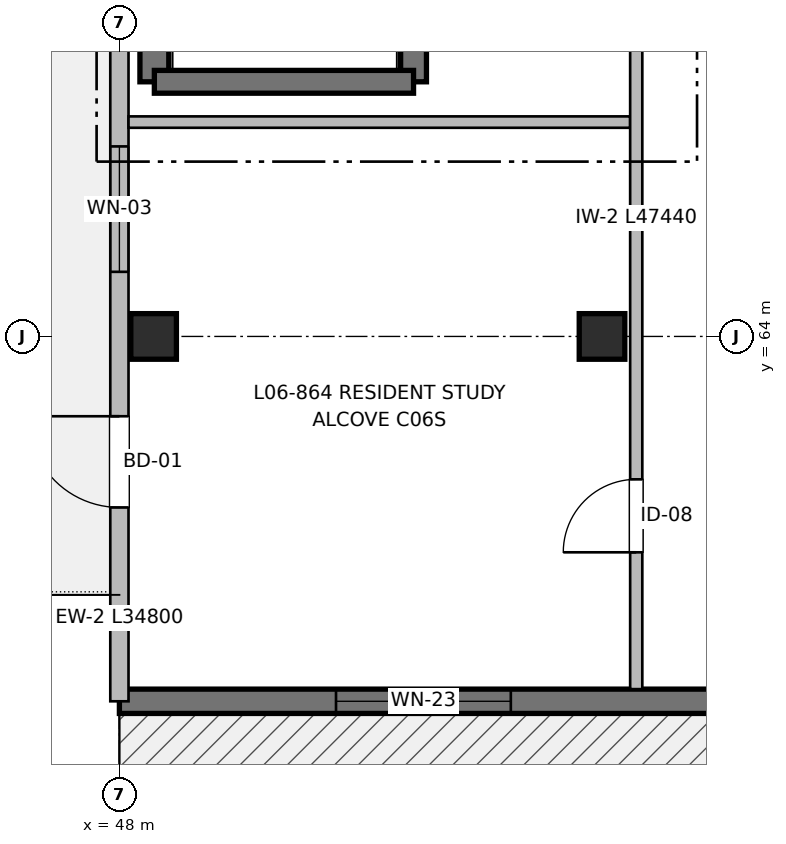
"""IFC4 building model, lengths in metres.
Left out: names, types, materials, properties, quantities, classifications, styles, units other than length and angle.
Written with IfcOpenShell. Run it as: python <this file> out.ifc"""

import sys

from ifc_helpers import new_model, si_unit, direction, frame, frame_2d, origin, origin_2d, place, context, subcontext, project, spatial, rectangle, extrude, element, fill, save


model = new_model("IFC4")
c1 = context("Model", 3, precision=1e-05, world=origin(), true_north=direction((0.0, 1.0)))
c2 = subcontext(c1, "Body", "Model", "MODEL_VIEW")
j1 = project(units=[si_unit("LENGTHUNIT", "METRE"), si_unit("PLANEANGLEUNIT", "RADIAN")], contexts=[c1])
p1 = place(None, origin())
s1 = spatial("IfcSite", under=j1, at=p1, CompositionType="ELEMENT")
p2 = place(p1, origin())
s2 = spatial("IfcBuilding", under=s1, at=p2, CompositionType="ELEMENT")
p3 = place(p2, frame((0.0, 0.0, 20.16)))
s3 = spatial("IfcBuildingStorey", under=s2, at=p3, CompositionType="ELEMENT", Elevation=20.16)
for number, where, z_axis, x_axis in (
    (1, (48.45, 64.0, 0.0), (0.0, 0.0, 1.0), (1.0, 0.0, 0.0)),
    (2, (54.35, 64.0, 0.0), (0.0, 0.0, 1.0), (1.0, 0.0, 0.0)),
):
    element("IfcColumn", number, at=place(p3, frame(where, z_axis=z_axis, x_axis=x_axis)), inside=s3, PredefinedType="COLUMN", context=c2, shape_type="SweptSolid", body=[
        extrude(rectangle(XDim=0.6, YDim=0.6, at=origin_2d()), origin(), (0.0, 0.0, 1.0), 3.2),
    ])
p4 = place(p3, frame((48.46, 67.35, 0.0), z_axis=(0.0, 0.0, 1.0), x_axis=(0.0, 1.0, 0.0)))
e3 = element("IfcWall", 3, at=p4, inside=s3, PredefinedType="SHEAR", context=c2, shape_type="SweptSolid", body=[
    extrude(rectangle(XDim=12.45, YDim=0.38, at=frame_2d((6.225, 0.0))), origin(), (0.0, 0.0, 1.0), 3.2),
])
p5 = place(p4, frame((2.2, 0.0, 0.97)))
e4 = element("IfcOpeningElement", 4, at=p5, cuts=e3, PredefinedType="OPENING", context=c2, shape_type="SweptSolid", body=[
    extrude(rectangle(XDim=0.95, YDim=1.25, at=frame_2d((0.475, 0.625))), frame((0.0, 0.2, 0.0), z_axis=(0.0, -1.0, 0.0), x_axis=(1.0, 0.0, 0.0)), (0.0, 0.0, 1.0), 0.4),
])
p6 = place(p3, frame((51.87, 79.8, 0.0), z_axis=(0.0, 0.0, 1.0), x_axis=(0.0, -1.0, 0.0)))
e5 = element("IfcWall", 5, at=p6, inside=s3, PredefinedType="SHEAR", context=c2, shape_type="SweptSolid", body=[
    extrude(rectangle(XDim=12.45, YDim=0.34, at=frame_2d((6.225, 0.0))), origin(), (0.0, 0.0, 1.0), 3.2),
])
p7 = place(p6, frame((10.85, 0.0, 0.0)))
e6 = element("IfcOpeningElement", 6, at=p7, cuts=e5, PredefinedType="OPENING", context=c2, shape_type="SweptSolid", body=[
    extrude(rectangle(XDim=1.05, YDim=2.15, at=frame_2d((0.525, 1.075))), frame((0.0, 0.18, 0.0), z_axis=(0.0, -1.0, 0.0), x_axis=(1.0, 0.0, 0.0)), (0.0, 0.0, 1.0), 0.36),
])
p8 = place(p3, frame((51.87, 67.35, 0.0), z_axis=(0.0, 0.0, 1.0), x_axis=(-1.0, 0.0, 0.0)))
e7 = element("IfcWall", 7, at=p8, inside=s3, PredefinedType="SHEAR", context=c2, shape_type="SweptSolid", body=[
    extrude(rectangle(XDim=3.41, YDim=0.3, at=frame_2d((1.705, 0.0))), origin(), (0.0, 0.0, 1.0), 3.2),
])
p9 = place(p3, frame((64.0, 59.2, 0.0), z_axis=(0.0, 0.0, 1.0), x_axis=(-1.0, 0.0, 0.0)))
e8 = element("IfcWall", 8, at=p9, inside=s3, PredefinedType="SHEAR", context=c2, shape_type="SweptSolid", body=[
    extrude(rectangle(XDim=16.0, YDim=0.32, at=frame_2d((8.0, 0.0))), origin(), (0.0, 0.0, 1.0), 2.98),
])
p10 = place(p9, frame((2.55, 0.0, 0.0)))
e9 = element("IfcOpeningElement", 9, at=p10, cuts=e8, PredefinedType="OPENING", context=c2, shape_type="SweptSolid", body=[
    extrude(rectangle(XDim=1.35, YDim=2.2, at=frame_2d((0.675, 1.1))), frame((0.0, 0.17, 0.0), z_axis=(0.0, -1.0, 0.0), x_axis=(1.0, 0.0, 0.0)), (0.0, 0.0, 1.0), 0.34),
])
p11 = place(p9, frame((10.85, 0.0, 0.57)))
e10 = element("IfcOpeningElement", 10, at=p11, cuts=e8, PredefinedType="OPENING", context=c2, shape_type="SweptSolid", body=[
    extrude(rectangle(XDim=2.3, YDim=1.65, at=frame_2d((1.15, 0.825))), frame((0.0, 0.17, 0.0), z_axis=(0.0, -1.0, 0.0), x_axis=(1.0, 0.0, 0.0)), (0.0, 0.0, 1.0), 0.34),
])
p12 = place(p3, frame((48.0, 59.2, 0.0), z_axis=(0.0, 0.0, 1.0), x_axis=(0.0, 1.0, 0.0)))
e11 = element("IfcWall", 11, at=p12, inside=s3, PredefinedType="SOLIDWALL", context=c2, shape_type="SweptSolid", body=[
    extrude(rectangle(XDim=34.8, YDim=0.24, at=frame_2d((17.4, 0.0))), origin(), (0.0, 0.0, 1.0), 2.98),
])
p13 = place(p12, frame((2.55, 0.0, 0.0)))
e12 = element("IfcOpeningElement", 12, at=p13, cuts=e11, PredefinedType="OPENING", context=c2, shape_type="SweptSolid", body=[
    extrude(rectangle(XDim=1.2, YDim=2.2, at=frame_2d((0.6, 1.1))), frame((0.0, 0.13, 0.0), z_axis=(0.0, -1.0, 0.0), x_axis=(1.0, 0.0, 0.0)), (0.0, 0.0, 1.0), 0.26),
])
p14 = place(p12, frame((5.65, 0.0, 0.77)))
e13 = element("IfcOpeningElement", 13, at=p14, cuts=e11, PredefinedType="OPENING", context=c2, shape_type="SweptSolid", body=[
    extrude(rectangle(XDim=1.65, YDim=1.45, at=frame_2d((0.825, 0.725))), frame((0.0, 0.13, 0.0), z_axis=(0.0, -1.0, 0.0), x_axis=(1.0, 0.0, 0.0)), (0.0, 0.0, 1.0), 0.26),
])
p15 = place(p12, frame((11.9, 0.0, 0.57)))
e14 = element("IfcOpeningElement", 14, at=p15, cuts=e11, PredefinedType="OPENING", context=c2, shape_type="SweptSolid", body=[
    extrude(rectangle(XDim=2.3, YDim=1.65, at=frame_2d((1.15, 0.825))), frame((0.0, 0.13, 0.0), z_axis=(0.0, -1.0, 0.0), x_axis=(1.0, 0.0, 0.0)), (0.0, 0.0, 1.0), 0.26),
])
p16 = place(p12, frame((21.025, 0.0, 0.77)))
e15 = element("IfcOpeningElement", 15, at=p16, cuts=e11, PredefinedType="OPENING", context=c2, shape_type="SweptSolid", body=[
    extrude(rectangle(XDim=1.45, YDim=1.45, at=frame_2d((0.725, 0.725))), frame((0.0, 0.13, 0.0), z_axis=(0.0, -1.0, 0.0), x_axis=(1.0, 0.0, 0.0)), (0.0, 0.0, 1.0), 0.26),
])
p17 = place(p12, frame((29.475, 0.0, 0.72)))
e16 = element("IfcOpeningElement", 16, at=p17, cuts=e11, PredefinedType="OPENING", context=c2, shape_type="SweptSolid", body=[
    extrude(rectangle(XDim=1.95, YDim=1.5, at=frame_2d((0.975, 0.75))), frame((0.0, 0.13, 0.0), z_axis=(0.0, -1.0, 0.0), x_axis=(1.0, 0.0, 0.0)), (0.0, 0.0, 1.0), 0.26),
])
p18 = place(p3, frame((48.12, 66.82, 0.0), z_axis=(0.0, 0.0, 1.0), x_axis=(1.0, 0.0, 0.0)))
e17 = element("IfcWall", 17, at=p18, inside=s3, PredefinedType="PARTITIONING", context=c2, shape_type="SweptSolid", body=[
    extrude(rectangle(XDim=6.6, YDim=0.15, at=frame_2d((3.3, 0.0))), origin(), (0.0, 0.0, 1.0), 2.935),
])
p19 = place(p3, frame((54.8, 59.36, 0.0), z_axis=(0.0, 0.0, 1.0), x_axis=(0.0, 1.0, 0.0)))
e18 = element("IfcWall", 18, at=p19, inside=s3, PredefinedType="PARTITIONING", context=c2, shape_type="SweptSolid", body=[
    extrude(rectangle(XDim=47.44, YDim=0.16, at=frame_2d((23.72, 0.0))), origin(), (0.0, 0.0, 1.0), 2.935),
])
p20 = place(p19, frame((9.64, 0.0, 0.0)))
e19 = element("IfcOpeningElement", 19, at=p20, cuts=e18, PredefinedType="OPENING", context=c2, shape_type="SweptSolid", body=[
    extrude(rectangle(XDim=1.1, YDim=2.15, at=frame_2d((0.55, 1.075))), frame((0.0, 0.09, 0.0), z_axis=(0.0, -1.0, 0.0), x_axis=(1.0, 0.0, 0.0)), (0.0, 0.0, 1.0), 0.18),
])
p21 = place(p19, frame((16.04, 0.0, 0.0)))
e20 = element("IfcOpeningElement", 20, at=p21, cuts=e18, PredefinedType="OPENING", context=c2, shape_type="SweptSolid", body=[
    extrude(rectangle(XDim=1.6, YDim=2.15, at=frame_2d((0.8, 1.075))), frame((0.0, 0.09, 0.0), z_axis=(0.0, -1.0, 0.0), x_axis=(1.0, 0.0, 0.0)), (0.0, 0.0, 1.0), 0.18),
])
p22 = place(p19, frame((1.8, 0.0, 0.0)))
e21 = element("IfcOpeningElement", 21, at=p22, cuts=e18, PredefinedType="OPENING", context=c2, shape_type="SweptSolid", body=[
    extrude(rectangle(XDim=0.96, YDim=2.15, at=frame_2d((0.48, 1.075))), frame((0.0, 0.09, 0.0), z_axis=(0.0, -1.0, 0.0), x_axis=(1.0, 0.0, 0.0)), (0.0, 0.0, 1.0), 0.18),
])
p23 = place(p19, frame((29.645, 0.0, 0.0)))
e22 = element("IfcOpeningElement", 22, at=p23, cuts=e18, PredefinedType="OPENING", context=c2, shape_type="SweptSolid", body=[
    extrude(rectangle(XDim=0.98, YDim=2.15, at=frame_2d((0.49, 1.075))), frame((0.0, 0.09, 0.0), z_axis=(0.0, -1.0, 0.0), x_axis=(1.0, 0.0, 0.0)), (0.0, 0.0, 1.0), 0.18),
])
p24 = place(p19, frame((37.455, 0.0, 0.0)))
e23 = element("IfcOpeningElement", 23, at=p24, cuts=e18, PredefinedType="OPENING", context=c2, shape_type="SweptSolid", body=[
    extrude(rectangle(XDim=0.98, YDim=2.15, at=frame_2d((0.49, 1.075))), frame((0.0, 0.09, 0.0), z_axis=(0.0, -1.0, 0.0), x_axis=(1.0, 0.0, 0.0)), (0.0, 0.0, 1.0), 0.18),
])
p25 = place(p11, origin())
e24 = element("IfcWindow", 24, at=p25, inside=s3, PartitioningType="SINGLE_PANEL", PredefinedType="WINDOW", context=c2, shape_type="SweptSolid", body=[
    extrude(rectangle(XDim=2.3, YDim=1.65, at=frame_2d((1.15, 0.825))), frame((0.0, 0.03, 0.0), z_axis=(0.0, -1.0, 0.0), x_axis=(1.0, 0.0, 0.0)), (0.0, 0.0, 1.0), 0.06),
])
fill(e10, e24)
p26 = place(p13, origin())
e25 = element("IfcDoor", 25, at=p26, inside=s3, OperationType="SINGLE_SWING_RIGHT", PredefinedType="DOOR", context=c2, shape_type="SweptSolid", body=[
    extrude(rectangle(XDim=1.2, YDim=2.2, at=frame_2d((0.6, 1.1))), frame((0.0, 0.025, 0.0), z_axis=(0.0, -1.0, 0.0), x_axis=(1.0, 0.0, 0.0)), (0.0, 0.0, 1.0), 0.05),
])
fill(e12, e25)
p27 = place(p14, origin())
e26 = element("IfcWindow", 26, at=p27, inside=s3, PartitioningType="SINGLE_PANEL", PredefinedType="WINDOW", context=c2, shape_type="SweptSolid", body=[
    extrude(rectangle(XDim=1.65, YDim=1.45, at=frame_2d((0.825, 0.725))), frame((0.0, 0.03, 0.0), z_axis=(0.0, -1.0, 0.0), x_axis=(1.0, 0.0, 0.0)), (0.0, 0.0, 1.0), 0.06),
])
fill(e13, e26)
p28 = place(p22, origin())
e27 = element("IfcDoor", 27, at=p28, inside=s3, OperationType="SINGLE_SWING_LEFT", PredefinedType="DOOR", context=c2, shape_type="SweptSolid", body=[
    extrude(rectangle(XDim=0.96, YDim=2.15, at=frame_2d((0.48, 1.075))), frame((0.0, 0.025, 0.0), z_axis=(0.0, -1.0, 0.0), x_axis=(1.0, 0.0, 0.0)), (0.0, 0.0, 1.0), 0.05),
])
fill(e21, e27)
save(model, sys.argv[1])
